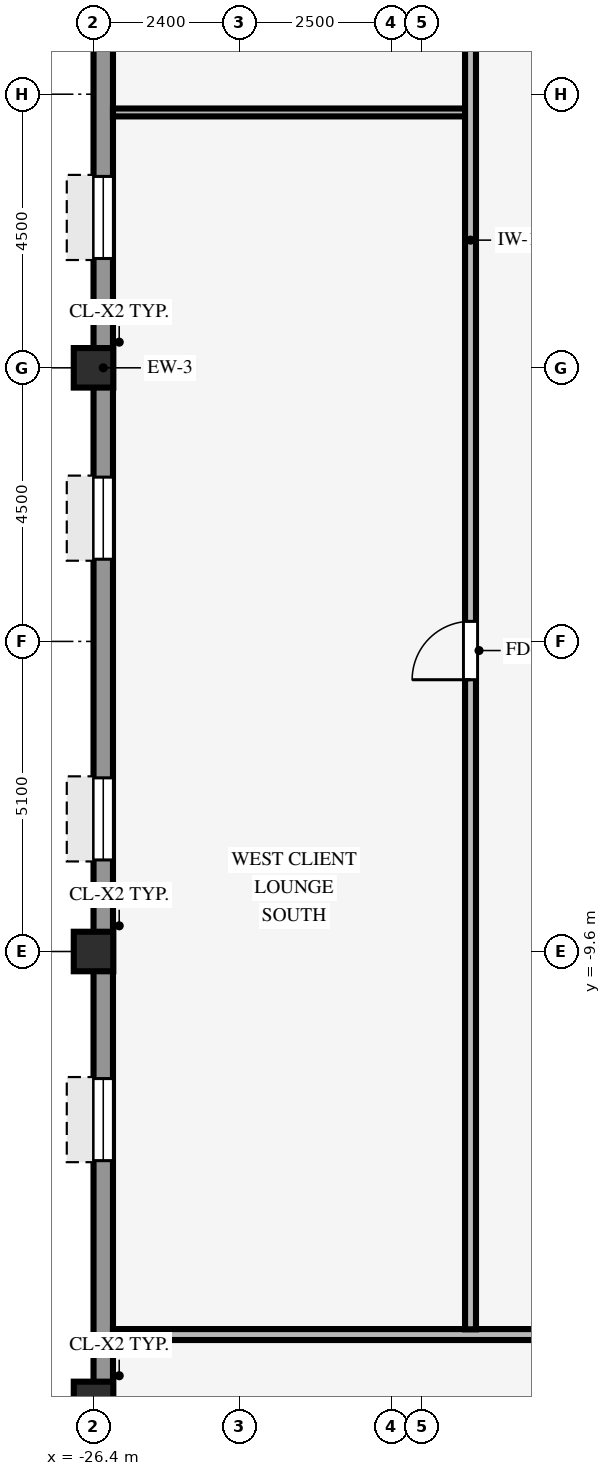
"""IFC4 building model, lengths in metres.
Left out: names, types, materials, properties, quantities, classifications, styles, units other than length and angle.
Written with IfcOpenShell. Run it as: python <this file> out.ifc"""

import sys

from ifc_helpers import new_model, si_unit, direction, frame, frame_2d, origin, origin_2d, place, context, subcontext, project, spatial, rectangle, hollow_rectangle, extrude, source, transform, mapped, element, fill, save


model = new_model("IFC4")
c1 = context("Model", 3, precision=1e-05, world=origin(), true_north=direction((0.0, 1.0)))
c2 = subcontext(c1, "Body", "Model", "MODEL_VIEW")
j1 = project(units=[si_unit("LENGTHUNIT", "METRE"), si_unit("PLANEANGLEUNIT", "RADIAN")], contexts=[c1])
p1 = place(None, origin())
s1 = spatial("IfcSite", under=j1, at=p1, CompositionType="ELEMENT")
p2 = place(p1, origin())
s2 = spatial("IfcBuilding", under=s1, at=p2, CompositionType="ELEMENT")
p3 = place(p2, frame((0.0, 0.0, 138.45)))
s3 = spatial("IfcBuildingStorey", under=s2, at=p3, CompositionType="ELEMENT", Elevation=138.45)
for number, where, z_axis, x_axis in (
    (1, (-26.4, -17.0, 0.0), (0.0, 0.0, 1.0), (1.0, 0.0, 0.0)),
    (2, (-26.4, -9.6, 0.0), (0.0, 0.0, 1.0), (1.0, 0.0, 0.0)),
    (3, (-26.4, 0.0, 0.0), (0.0, 0.0, 1.0), (1.0, 0.0, 0.0)),
):
    element("IfcColumn", number, at=place(p3, frame(where, z_axis=z_axis, x_axis=x_axis)), inside=s3, PredefinedType="COLUMN", context=c2, shape_type="SweptSolid", body=[
        extrude(hollow_rectangle(XDim=0.65, YDim=0.65, WallThickness=0.04, InnerFilletRadius=0.04, OuterFilletRadius=0.08, at=origin_2d()), origin(), (0.0, 0.0, 1.0), 3.37),
    ])
p4 = place(p3, frame((-26.24, -20.784, 0.0), z_axis=(0.0, 0.0, 1.0), x_axis=(0.0, 1.0, 0.0)))
e4 = element("IfcWall", 4, at=p4, inside=s3, PredefinedType="STANDARD", context=c2, shape_type="SweptSolid", body=[
    extrude(rectangle(XDim=41.568, YDim=0.32, at=frame_2d((20.784, 0.0))), origin(), (0.0, 0.0, 1.0), 2.705),
])
p5 = place(p4, frame((1.448, 0.0, 0.8)))
e5 = element("IfcOpeningElement", 5, at=p5, cuts=e4, PredefinedType="OPENING", context=c2, shape_type="SweptSolid", body=[
    extrude(rectangle(XDim=1.35, YDim=1.56, at=frame_2d((0.675, 0.78))), frame((0.0, 0.17, 0.0), z_axis=(0.0, -1.0, 0.0), x_axis=(1.0, 0.0, 0.0)), (0.0, 0.0, 1.0), 0.34),
])
p6 = place(p4, frame((7.744, 0.0, 0.8)))
e6 = element("IfcOpeningElement", 6, at=p6, cuts=e4, PredefinedType="OPENING", context=c2, shape_type="SweptSolid", body=[
    extrude(rectangle(XDim=1.35, YDim=1.56, at=frame_2d((0.675, 0.78))), frame((0.0, 0.17, 0.0), z_axis=(0.0, -1.0, 0.0), x_axis=(1.0, 0.0, 0.0)), (0.0, 0.0, 1.0), 0.34),
])
p7 = place(p4, frame((12.69, 0.0, 0.8)))
e7 = element("IfcOpeningElement", 7, at=p7, cuts=e4, PredefinedType="OPENING", context=c2, shape_type="SweptSolid", body=[
    extrude(rectangle(XDim=1.35, YDim=1.56, at=frame_2d((0.675, 0.78))), frame((0.0, 0.17, 0.0), z_axis=(0.0, -1.0, 0.0), x_axis=(1.0, 0.0, 0.0)), (0.0, 0.0, 1.0), 0.34),
])
p8 = place(p4, frame((17.636, 0.0, 0.8)))
e8 = element("IfcOpeningElement", 8, at=p8, cuts=e4, PredefinedType="OPENING", context=c2, shape_type="SweptSolid", body=[
    extrude(rectangle(XDim=1.35, YDim=1.56, at=frame_2d((0.675, 0.78))), frame((0.0, 0.17, 0.0), z_axis=(0.0, -1.0, 0.0), x_axis=(1.0, 0.0, 0.0)), (0.0, 0.0, 1.0), 0.34),
])
p9 = place(p4, frame((22.582, 0.0, 0.8)))
e9 = element("IfcOpeningElement", 9, at=p9, cuts=e4, PredefinedType="OPENING", context=c2, shape_type="SweptSolid", body=[
    extrude(rectangle(XDim=1.35, YDim=1.56, at=frame_2d((0.675, 0.78))), frame((0.0, 0.17, 0.0), z_axis=(0.0, -1.0, 0.0), x_axis=(1.0, 0.0, 0.0)), (0.0, 0.0, 1.0), 0.34),
])
p10 = place(p4, frame((27.528, 0.0, 0.8)))
e10 = element("IfcOpeningElement", 10, at=p10, cuts=e4, PredefinedType="OPENING", context=c2, shape_type="SweptSolid", body=[
    extrude(rectangle(XDim=1.35, YDim=1.56, at=frame_2d((0.675, 0.78))), frame((0.0, 0.17, 0.0), z_axis=(0.0, -1.0, 0.0), x_axis=(1.0, 0.0, 0.0)), (0.0, 0.0, 1.0), 0.34),
])
p11 = place(p4, frame((32.474, 0.0, 0.8)))
e11 = element("IfcOpeningElement", 11, at=p11, cuts=e4, PredefinedType="OPENING", context=c2, shape_type="SweptSolid", body=[
    extrude(rectangle(XDim=1.35, YDim=1.56, at=frame_2d((0.675, 0.78))), frame((0.0, 0.17, 0.0), z_axis=(0.0, -1.0, 0.0), x_axis=(1.0, 0.0, 0.0)), (0.0, 0.0, 1.0), 0.34),
])
p12 = place(p4, frame((38.77, 0.0, 0.8)))
e12 = element("IfcOpeningElement", 12, at=p12, cuts=e4, PredefinedType="OPENING", context=c2, shape_type="SweptSolid", body=[
    extrude(rectangle(XDim=1.35, YDim=1.56, at=frame_2d((0.675, 0.78))), frame((0.0, 0.17, 0.0), z_axis=(0.0, -1.0, 0.0), x_axis=(1.0, 0.0, 0.0)), (0.0, 0.0, 1.0), 0.34),
])
p13 = place(p3, frame((-26.08, -15.9, 0.0), z_axis=(0.0, 0.0, 1.0), x_axis=(1.0, 0.0, 0.0)))
e13 = element("IfcWall", 13, at=p13, inside=s3, PredefinedType="PARTITIONING", context=c2, shape_type="SweptSolid", body=[
    extrude(rectangle(XDim=52.16, YDim=0.18, at=frame_2d((26.08, 0.0))), origin(), (0.0, 0.0, 1.0), 3.36),
])
p14 = place(p13, frame((18.3, 0.0, 0.0)))
e14 = element("IfcOpeningElement", 14, at=p14, cuts=e13, PredefinedType="OPENING", context=c2, shape_type="SweptSolid", body=[
    extrude(rectangle(XDim=0.96, YDim=2.1, at=frame_2d((0.48, 1.05))), frame((0.0, 0.1, 0.0), z_axis=(0.0, -1.0, 0.0), x_axis=(1.0, 0.0, 0.0)), (0.0, 0.0, 1.0), 0.2),
])
p15 = place(p13, frame((40.5, 0.0, 0.0)))
e15 = element("IfcOpeningElement", 15, at=p15, cuts=e13, PredefinedType="OPENING", context=c2, shape_type="SweptSolid", body=[
    extrude(rectangle(XDim=0.96, YDim=2.1, at=frame_2d((0.48, 1.05))), frame((0.0, 0.1, 0.0), z_axis=(0.0, -1.0, 0.0), x_axis=(1.0, 0.0, 0.0)), (0.0, 0.0, 1.0), 0.2),
])
p16 = place(p3, frame((-26.08, 4.2, 0.0), z_axis=(0.0, 0.0, 1.0), x_axis=(1.0, 0.0, 0.0)))
e16 = element("IfcWall", 16, at=p16, inside=s3, PredefinedType="PARTITIONING", context=c2, shape_type="SweptSolid", body=[
    extrude(rectangle(XDim=5.794, YDim=0.13, at=frame_2d((2.897, 0.0))), origin(), (0.0, 0.0, 1.0), 3.36),
])
p17 = place(p3, frame((-20.2, -15.814, 0.0), z_axis=(0.0, 0.0, 1.0), x_axis=(0.0, 1.0, 0.0)))
e17 = element("IfcWall", 17, at=p17, inside=s3, PredefinedType="PARTITIONING", context=c2, shape_type="SweptSolid", body=[
    extrude(rectangle(XDim=31.628, YDim=0.18, at=frame_2d((15.814, 0.0))), origin(), (0.0, 0.0, 1.0), 3.36),
])
p18 = place(p17, frame((10.684, 0.0, 0.0)))
e18 = element("IfcOpeningElement", 18, at=p18, cuts=e17, PredefinedType="OPENING", context=c2, shape_type="SweptSolid", body=[
    extrude(rectangle(XDim=0.96, YDim=2.1, at=frame_2d((0.48, 1.05))), frame((0.0, 0.1, 0.0), z_axis=(0.0, -1.0, 0.0), x_axis=(1.0, 0.0, 0.0)), (0.0, 0.0, 1.0), 0.2),
])
p19 = place(p17, frame((24.184, 0.0, 0.0)))
e19 = element("IfcOpeningElement", 19, at=p19, cuts=e17, PredefinedType="OPENING", context=c2, shape_type="SweptSolid", body=[
    extrude(rectangle(XDim=0.96, YDim=2.1, at=frame_2d((0.48, 1.05))), frame((0.0, 0.1, 0.0), z_axis=(0.0, -1.0, 0.0), x_axis=(1.0, 0.0, 0.0)), (0.0, 0.0, 1.0), 0.2),
])
m1 = source(origin(), c2, "Body", "SweptSolid", [
    extrude(rectangle(XDim=1.35, YDim=1.56, at=frame_2d((0.675, 0.78))), frame((0.0, 0.03, 0.0), z_axis=(0.0, -1.0, 0.0), x_axis=(1.0, 0.0, 0.0)), (0.0, 0.0, 1.0), 0.06),
])
p20 = place(p6, origin())
e20 = element("IfcWindow", 20, at=p20, inside=s3, PartitioningType="SINGLE_PANEL", PredefinedType="WINDOW", context=c2, shape_type="MappedRepresentation", body=[
    mapped(m1, transform((0.0, 0.0, 0.0), scale=1.0)),
])
fill(e6, e20)
p21 = place(p7, origin())
e21 = element("IfcWindow", 21, at=p21, inside=s3, PartitioningType="SINGLE_PANEL", PredefinedType="WINDOW", context=c2, shape_type="MappedRepresentation", body=[
    mapped(m1, transform((0.0, 0.0, 0.0), scale=1.0)),
])
fill(e7, e21)
p22 = place(p8, origin())
e22 = element("IfcWindow", 22, at=p22, inside=s3, PartitioningType="SINGLE_PANEL", PredefinedType="WINDOW", context=c2, shape_type="MappedRepresentation", body=[
    mapped(m1, transform((0.0, 0.0, 0.0), scale=1.0)),
])
fill(e8, e22)
p23 = place(p9, origin())
e23 = element("IfcWindow", 23, at=p23, inside=s3, PartitioningType="SINGLE_PANEL", PredefinedType="WINDOW", context=c2, shape_type="MappedRepresentation", body=[
    mapped(m1, transform((0.0, 0.0, 0.0), scale=1.0)),
])
fill(e9, e23)
m2 = source(origin(), c2, "Body", "SweptSolid", [
    extrude(rectangle(XDim=0.96, YDim=2.1, at=frame_2d((0.48, 1.05))), frame((0.0, 0.025, 0.0), z_axis=(0.0, -1.0, 0.0), x_axis=(1.0, 0.0, 0.0)), (0.0, 0.0, 1.0), 0.05),
])
p24 = place(p18, origin())
e24 = element("IfcDoor", 24, at=p24, inside=s3, OperationType="SINGLE_SWING_LEFT", PredefinedType="DOOR", context=c2, shape_type="MappedRepresentation", body=[
    mapped(m2, transform((0.0, 0.0, 0.0), scale=1.0)),
])
fill(e18, e24)
save(model, sys.argv[1])
